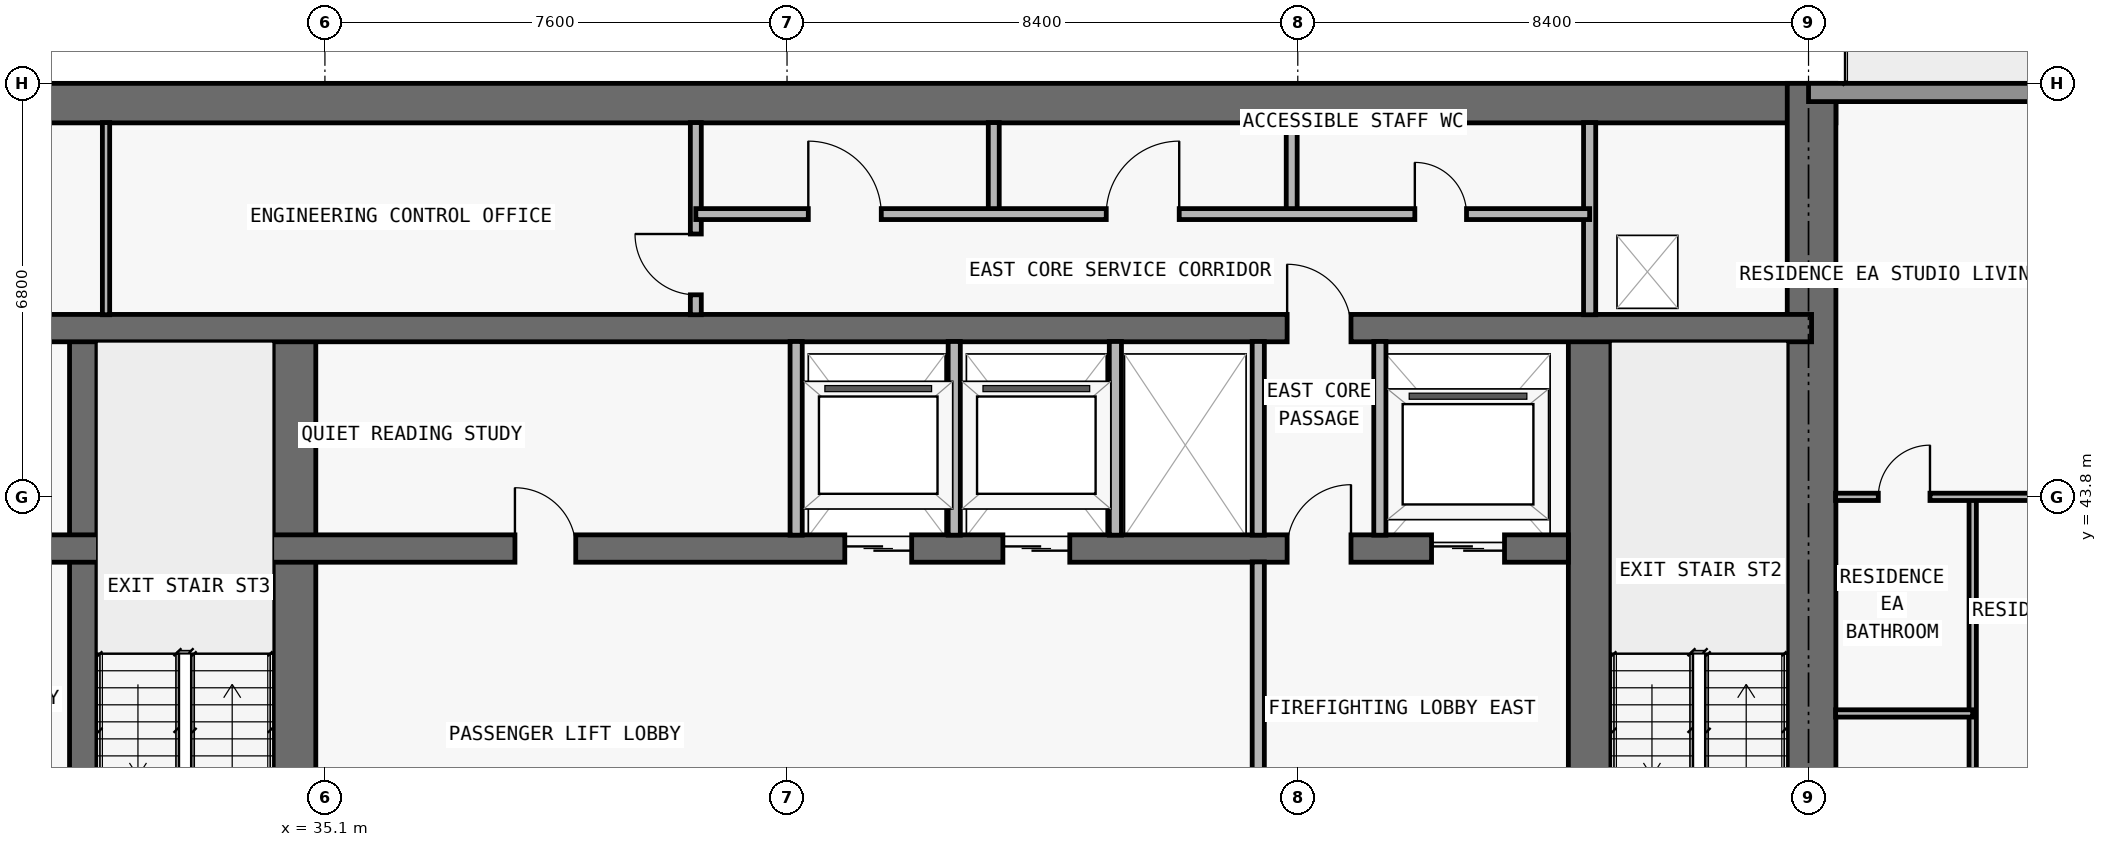
"""IFC4 building model, lengths in metres.
Left out: names, types, materials, properties, quantities, classifications, styles, units other than length and angle.
Written with IfcOpenShell. Run it as: python <this file> out.ifc"""

import sys

from ifc_helpers import new_model, si_unit, direction, frame, frame_2d, origin, place, context, subcontext, project, spatial, rectangle, extrude, element, fill, save


model = new_model("IFC4")
c1 = context("Model", 3, precision=1e-05, world=origin(), true_north=direction((0.0, 1.0)))
c2 = subcontext(c1, "Body", "Model", "MODEL_VIEW")
j1 = project(units=[si_unit("LENGTHUNIT", "METRE"), si_unit("PLANEANGLEUNIT", "RADIAN")], contexts=[c1])
p1 = place(None, origin())
s1 = spatial("IfcSite", under=j1, at=p1, CompositionType="ELEMENT")
p2 = place(p1, origin())
s2 = spatial("IfcBuilding", under=s1, at=p2, CompositionType="ELEMENT")
p3 = place(p2, frame((0.0, 0.0, 102.6)))
s3 = spatial("IfcBuildingStorey", under=s2, at=p3, CompositionType="ELEMENT", Elevation=102.6)
p4 = place(p3, frame((17.85, 50.275, 0.0), z_axis=(0.0, 0.0, 1.0), x_axis=(1.0, 0.0, 0.0)))
e1 = element("IfcWall", 1, at=p4, inside=s3, PredefinedType="SHEAR", context=c2, shape_type="SweptSolid", body=[
    extrude(rectangle(XDim=42.1, YDim=0.65, at=frame_2d((21.05, 0.0))), origin(), (0.0, 0.0, 1.0), 3.05),
])
p5 = place(p3, frame((59.55, 36.55, 0.0), z_axis=(0.0, 0.0, 1.0), x_axis=(0.0, 1.0, 0.0)))
e2 = element("IfcWall", 2, at=p5, inside=s3, PredefinedType="SHEAR", context=c2, shape_type="SweptSolid", body=[
    extrude(rectangle(XDim=14.05, YDim=0.8, at=frame_2d((7.025, 0.0))), origin(), (0.0, 0.0, 1.0), 3.05),
])
p6 = place(p3, frame((55.9, 36.95, 0.0), z_axis=(0.0, 0.0, 1.0), x_axis=(0.0, 1.0, 0.0)))
e3 = element("IfcWall", 3, at=p6, inside=s3, PredefinedType="SHEAR", context=c2, shape_type="SweptSolid", body=[
    extrude(rectangle(XDim=9.625, YDim=0.7, at=frame_2d((4.812, 0.0))), origin(), (0.0, 0.0, 1.0), 3.05),
])
p7 = place(p6, frame((0.6, 0.0, 0.0)))
e4 = element("IfcOpeningElement", 4, at=p7, cuts=e3, PredefinedType="OPENING", context=c2, shape_type="SweptSolid", body=[
    extrude(rectangle(XDim=1.1, YDim=2.15, at=frame_2d((0.55, 1.075))), frame((0.0, 0.36, 0.0), z_axis=(0.0, -1.0, 0.0), x_axis=(1.0, 0.0, 0.0)), (0.0, 0.0, 1.0), 0.72),
])
p8 = place(p3, frame((31.125, 36.95, 0.0), z_axis=(0.0, 0.0, 1.0), x_axis=(0.0, 1.0, 0.0)))
e5 = element("IfcWall", 5, at=p8, inside=s3, PredefinedType="SHEAR", context=c2, shape_type="SweptSolid", body=[
    extrude(rectangle(XDim=9.625, YDim=0.45, at=frame_2d((4.812, 0.0))), origin(), (0.0, 0.0, 1.0), 3.05),
])
p9 = place(p3, frame((34.6, 36.95, 0.0), z_axis=(0.0, 0.0, 1.0), x_axis=(0.0, 1.0, 0.0)))
e6 = element("IfcWall", 6, at=p9, inside=s3, PredefinedType="SHEAR", context=c2, shape_type="SweptSolid", body=[
    extrude(rectangle(XDim=9.625, YDim=0.7, at=frame_2d((4.812, 0.0))), origin(), (0.0, 0.0, 1.0), 3.05),
])
p10 = place(p3, frame((22.25, 42.95, 0.0), z_axis=(0.0, 0.0, 1.0), x_axis=(1.0, 0.0, 0.0)))
e7 = element("IfcWall", 7, at=p10, inside=s3, PredefinedType="SHEAR", context=c2, shape_type="SweptSolid", body=[
    extrude(rectangle(XDim=33.3, YDim=0.45, at=frame_2d((16.65, 0.0))), origin(), (0.0, 0.0, 1.0), 3.05),
])
p11 = place(p10, frame((1.05, 0.0, 0.0)))
e8 = element("IfcOpeningElement", 8, at=p11, cuts=e7, PredefinedType="OPENING", context=c2, shape_type="SweptSolid", body=[
    extrude(rectangle(XDim=1.2, YDim=2.2, at=frame_2d((0.6, 1.1))), frame((0.0, 0.235, 0.0), z_axis=(0.0, -1.0, 0.0), x_axis=(1.0, 0.0, 0.0)), (0.0, 0.0, 1.0), 0.47),
])
p12 = place(p10, frame((31.05, 0.0, 0.0)))
e9 = element("IfcOpeningElement", 9, at=p12, cuts=e7, PredefinedType="OPENING", context=c2, shape_type="SweptSolid", body=[
    extrude(rectangle(XDim=1.2, YDim=2.2, at=frame_2d((0.6, 1.1))), frame((0.0, 0.235, 0.0), z_axis=(0.0, -1.0, 0.0), x_axis=(1.0, 0.0, 0.0)), (0.0, 0.0, 1.0), 0.47),
])
p13 = place(p10, frame((21.4, 0.0, 0.0)))
e10 = element("IfcOpeningElement", 10, at=p13, cuts=e7, PredefinedType="OPENING", context=c2, shape_type="SweptSolid", body=[
    extrude(rectangle(XDim=1.1, YDim=2.2, at=frame_2d((0.55, 1.1))), frame((0.0, 0.235, 0.0), z_axis=(0.0, -1.0, 0.0), x_axis=(1.0, 0.0, 0.0)), (0.0, 0.0, 1.0), 0.47),
])
p14 = place(p10, frame((24.0, 0.0, 0.0)))
e11 = element("IfcOpeningElement", 11, at=p14, cuts=e7, PredefinedType="OPENING", context=c2, shape_type="SweptSolid", body=[
    extrude(rectangle(XDim=1.1, YDim=2.2, at=frame_2d((0.55, 1.1))), frame((0.0, 0.235, 0.0), z_axis=(0.0, -1.0, 0.0), x_axis=(1.0, 0.0, 0.0)), (0.0, 0.0, 1.0), 0.47),
])
p15 = place(p10, frame((3.625, 0.0, 0.0)))
e12 = element("IfcOpeningElement", 12, at=p15, cuts=e7, PredefinedType="OPENING", context=c2, shape_type="SweptSolid", body=[
    extrude(rectangle(XDim=1.05, YDim=2.15, at=frame_2d((0.525, 1.075))), frame((0.0, 0.235, 0.0), z_axis=(0.0, -1.0, 0.0), x_axis=(1.0, 0.0, 0.0)), (0.0, 0.0, 1.0), 0.47),
])
p16 = place(p10, frame((28.675, 0.0, 0.0)))
e13 = element("IfcOpeningElement", 13, at=p16, cuts=e7, PredefinedType="OPENING", context=c2, shape_type="SweptSolid", body=[
    extrude(rectangle(XDim=1.05, YDim=2.15, at=frame_2d((0.525, 1.075))), frame((0.0, 0.235, 0.0), z_axis=(0.0, -1.0, 0.0), x_axis=(1.0, 0.0, 0.0)), (0.0, 0.0, 1.0), 0.47),
])
p17 = place(p10, frame((15.975, 0.0, 0.0)))
e14 = element("IfcOpeningElement", 14, at=p17, cuts=e7, PredefinedType="OPENING", context=c2, shape_type="SweptSolid", body=[
    extrude(rectangle(XDim=1.0, YDim=2.2, at=frame_2d((0.5, 1.1))), frame((0.0, 0.235, 0.0), z_axis=(0.0, -1.0, 0.0), x_axis=(1.0, 0.0, 0.0)), (0.0, 0.0, 1.0), 0.47),
])
p18 = place(p3, frame((18.25, 46.575, 0.0), z_axis=(0.0, 0.0, 1.0), x_axis=(1.0, 0.0, 0.0)))
e15 = element("IfcWall", 15, at=p18, inside=s3, PredefinedType="SHEAR", context=c2, shape_type="SweptSolid", body=[
    extrude(rectangle(XDim=41.3, YDim=0.45, at=frame_2d((20.65, 0.0))), origin(), (0.0, 0.0, 1.0), 3.05),
])
p19 = place(p18, frame((7.65, 0.0, 0.0)))
e16 = element("IfcOpeningElement", 16, at=p19, cuts=e15, PredefinedType="OPENING", context=c2, shape_type="SweptSolid", body=[
    extrude(rectangle(XDim=1.0, YDim=2.2, at=frame_2d((0.5, 1.1))), frame((0.0, 0.235, 0.0), z_axis=(0.0, -1.0, 0.0), x_axis=(1.0, 0.0, 0.0)), (0.0, 0.0, 1.0), 0.47),
])
p20 = place(p18, frame((32.675, 0.0, 0.0)))
e17 = element("IfcOpeningElement", 17, at=p20, cuts=e15, PredefinedType="OPENING", context=c2, shape_type="SweptSolid", body=[
    extrude(rectangle(XDim=1.05, YDim=2.15, at=frame_2d((0.525, 1.075))), frame((0.0, 0.235, 0.0), z_axis=(0.0, -1.0, 0.0), x_axis=(1.0, 0.0, 0.0)), (0.0, 0.0, 1.0), 0.47),
])
p21 = place(p3, frame((59.5, 50.45, 0.0), z_axis=(0.0, 0.0, 1.0), x_axis=(1.0, 0.0, 0.0)))
e18 = element("IfcWall", 18, at=p21, inside=s3, PredefinedType="STANDARD", context=c2, shape_type="SweptSolid", body=[
    extrude(rectangle(XDim=10.6, YDim=0.3, at=frame_2d((5.3, 0.0))), origin(), (0.0, 0.0, 1.0), 3.05),
])
p22 = place(p21, frame((4.3, 0.0, 0.0)))
e19 = element("IfcOpeningElement", 19, at=p22, cuts=e18, PredefinedType="OPENING", context=c2, shape_type="SweptSolid", body=[
    extrude(rectangle(XDim=2.0, YDim=2.3, at=frame_2d((1.0, 1.15))), frame((0.0, 0.16, 0.0), z_axis=(0.0, -1.0, 0.0), x_axis=(1.0, 0.0, 0.0)), (0.0, 0.0, 1.0), 0.32),
])
p23 = place(p3, frame((31.5, 46.795, 0.0), z_axis=(0.0, 0.0, 1.0), x_axis=(0.0, 1.0, 0.0)))
e20 = element("IfcWall", 20, at=p23, inside=s3, PredefinedType="PARTITIONING", context=c2, shape_type="SweptSolid", body=[
    extrude(rectangle(XDim=3.16, YDim=0.12, at=frame_2d((1.58, 0.0))), origin(), (0.0, 0.0, 1.0), 3.05),
])
p24 = place(p3, frame((41.2, 46.795, 0.0), z_axis=(0.0, 0.0, 1.0), x_axis=(0.0, 1.0, 0.0)))
e21 = element("IfcWall", 21, at=p24, inside=s3, PredefinedType="PARTITIONING", context=c2, shape_type="SweptSolid", body=[
    extrude(rectangle(XDim=3.16, YDim=0.18, at=frame_2d((1.58, 0.0))), origin(), (0.0, 0.0, 1.0), 3.05),
])
p25 = place(p24, frame((0.327, 0.0, 0.0)))
e22 = element("IfcOpeningElement", 22, at=p25, cuts=e21, PredefinedType="OPENING", context=c2, shape_type="SweptSolid", body=[
    extrude(rectangle(XDim=1.0, YDim=2.2, at=frame_2d((0.5, 1.1))), frame((0.0, 0.1, 0.0), z_axis=(0.0, -1.0, 0.0), x_axis=(1.0, 0.0, 0.0)), (0.0, 0.0, 1.0), 0.2),
])
for number, where, z_axis, x_axis in (
    (23, (42.85, 43.17, 0.0), (0.0, 0.0, 1.0), (0.0, 1.0, 0.0)),
    (24, (45.45, 43.17, 0.0), (0.0, 0.0, 1.0), (0.0, 1.0, 0.0)),
):
    element("IfcWall", number, at=place(p3, frame(where, z_axis=z_axis, x_axis=x_axis)), inside=s3, PredefinedType="PARTITIONING", context=c2, shape_type="SweptSolid", body=[
        extrude(rectangle(XDim=3.185, YDim=0.2, at=frame_2d((1.593, 0.0))), origin(), (0.0, 0.0, 1.0), 3.05),
    ])
p26 = place(p3, frame((46.1, 48.45, 0.0), z_axis=(0.0, 0.0, 1.0), x_axis=(0.0, 1.0, 0.0)))
e25 = element("IfcWall", 25, at=p26, inside=s3, PredefinedType="PARTITIONING", context=c2, shape_type="SweptSolid", body=[
    extrude(rectangle(XDim=1.505, YDim=0.18, at=frame_2d((0.752, 0.0))), origin(), (0.0, 0.0, 1.0), 3.05),
])
p27 = place(p3, frame((48.1, 43.17, 0.0), z_axis=(0.0, 0.0, 1.0), x_axis=(0.0, 1.0, 0.0)))
e26 = element("IfcWall", 26, at=p27, inside=s3, PredefinedType="PARTITIONING", context=c2, shape_type="SweptSolid", body=[
    extrude(rectangle(XDim=3.185, YDim=0.2, at=frame_2d((1.593, 0.0))), origin(), (0.0, 0.0, 1.0), 3.05),
])
p28 = place(p3, frame((50.45, 37.345, 0.0), z_axis=(0.0, 0.0, 1.0), x_axis=(0.0, 1.0, 0.0)))
e27 = element("IfcWall", 27, at=p28, inside=s3, PredefinedType="PARTITIONING", context=c2, shape_type="SweptSolid", body=[
    extrude(rectangle(XDim=5.385, YDim=0.2, at=frame_2d((2.692, 0.0))), origin(), (0.0, 0.0, 1.0), 3.05),
])
p29 = place(p3, frame((50.45, 43.17, 0.0), z_axis=(0.0, 0.0, 1.0), x_axis=(0.0, 1.0, 0.0)))
e28 = element("IfcWall", 28, at=p29, inside=s3, PredefinedType="PARTITIONING", context=c2, shape_type="SweptSolid", body=[
    extrude(rectangle(XDim=3.185, YDim=0.2, at=frame_2d((1.593, 0.0))), origin(), (0.0, 0.0, 1.0), 3.05),
])
p30 = place(p3, frame((51.0, 48.45, 0.0), z_axis=(0.0, 0.0, 1.0), x_axis=(0.0, 1.0, 0.0)))
e29 = element("IfcWall", 29, at=p30, inside=s3, PredefinedType="PARTITIONING", context=c2, shape_type="SweptSolid", body=[
    extrude(rectangle(XDim=1.505, YDim=0.18, at=frame_2d((0.752, 0.0))), origin(), (0.0, 0.0, 1.0), 3.05),
])
p31 = place(p3, frame((52.45, 43.17, 0.0), z_axis=(0.0, 0.0, 1.0), x_axis=(0.0, 1.0, 0.0)))
e30 = element("IfcWall", 30, at=p31, inside=s3, PredefinedType="PARTITIONING", context=c2, shape_type="SweptSolid", body=[
    extrude(rectangle(XDim=3.185, YDim=0.2, at=frame_2d((1.593, 0.0))), origin(), (0.0, 0.0, 1.0), 3.05),
])
p32 = place(p3, frame((55.9, 46.795, 0.0), z_axis=(0.0, 0.0, 1.0), x_axis=(0.0, 1.0, 0.0)))
e31 = element("IfcWall", 31, at=p32, inside=s3, PredefinedType="PARTITIONING", context=c2, shape_type="SweptSolid", body=[
    extrude(rectangle(XDim=3.16, YDim=0.2, at=frame_2d((1.58, 0.0))), origin(), (0.0, 0.0, 1.0), 3.05),
])
p33 = place(p3, frame((62.2, 36.95, 0.0), z_axis=(0.0, 0.0, 1.0), x_axis=(0.0, 1.0, 0.0)))
e32 = element("IfcWall", 32, at=p33, inside=s3, PredefinedType="PARTITIONING", context=c2, shape_type="SweptSolid", body=[
    extrude(rectangle(XDim=6.85, YDim=0.12, at=frame_2d((3.425, 0.0))), origin(), (0.0, 0.0, 1.0), 3.05),
])
p34 = place(p33, frame((1.219, 0.0, 0.0)))
e33 = element("IfcOpeningElement", 33, at=p34, cuts=e32, PredefinedType="OPENING", context=c2, shape_type="SweptSolid", body=[
    extrude(rectangle(XDim=0.85, YDim=2.1, at=frame_2d((0.425, 1.05))), frame((0.0, 0.07, 0.0), z_axis=(0.0, -1.0, 0.0), x_axis=(1.0, 0.0, 0.0)), (0.0, 0.0, 1.0), 0.14),
])
p35 = place(p3, frame((59.945, 40.238, 0.0), z_axis=(0.0, 0.0, 1.0), x_axis=(1.0, 0.0, 0.0)))
e34 = element("IfcWall", 34, at=p35, inside=s3, PredefinedType="PARTITIONING", context=c2, shape_type="SweptSolid", body=[
    extrude(rectangle(XDim=2.255, YDim=0.12, at=frame_2d((1.127, 0.0))), origin(), (0.0, 0.0, 1.0), 3.05),
])
p36 = place(p3, frame((59.945, 43.8, 0.0), z_axis=(0.0, 0.0, 1.0), x_axis=(1.0, 0.0, 0.0)))
e35 = element("IfcWall", 35, at=p36, inside=s3, PredefinedType="PARTITIONING", context=c2, shape_type="SweptSolid", body=[
    extrude(rectangle(XDim=13.66, YDim=0.12, at=frame_2d((6.83, 0.0))), origin(), (0.0, 0.0, 1.0), 2.339),
])
p37 = place(p36, frame((4.017, 0.0, 0.0)))
e36 = element("IfcOpeningElement", 36, at=p37, cuts=e35, PredefinedType="OPENING", context=c2, shape_type="SweptSolid", body=[
    extrude(rectangle(XDim=0.9, YDim=2.15, at=frame_2d((0.45, 1.075))), frame((0.0, 0.07, 0.0), z_axis=(0.0, -1.0, 0.0), x_axis=(1.0, 0.0, 0.0)), (0.0, 0.0, 1.0), 0.14),
])
p38 = place(p36, frame((0.702, 0.0, 0.0)))
e37 = element("IfcOpeningElement", 37, at=p38, cuts=e35, PredefinedType="OPENING", context=c2, shape_type="SweptSolid", body=[
    extrude(rectangle(XDim=0.85, YDim=2.1, at=frame_2d((0.425, 1.05))), frame((0.0, 0.07, 0.0), z_axis=(0.0, -1.0, 0.0), x_axis=(1.0, 0.0, 0.0)), (0.0, 0.0, 1.0), 0.14),
])
p39 = place(p3, frame((41.2, 48.45, 0.0), z_axis=(0.0, 0.0, 1.0), x_axis=(1.0, 0.0, 0.0)))
e38 = element("IfcWall", 38, at=p39, inside=s3, PredefinedType="PARTITIONING", context=c2, shape_type="SweptSolid", body=[
    extrude(rectangle(XDim=14.7, YDim=0.18, at=frame_2d((7.35, 0.0))), origin(), (0.0, 0.0, 1.0), 3.05),
])
p40 = place(p39, frame((1.85, 0.0, 0.0)))
e39 = element("IfcOpeningElement", 39, at=p40, cuts=e38, PredefinedType="OPENING", context=c2, shape_type="SweptSolid", body=[
    extrude(rectangle(XDim=1.2, YDim=2.2, at=frame_2d((0.6, 1.1))), frame((0.0, 0.1, 0.0), z_axis=(0.0, -1.0, 0.0), x_axis=(1.0, 0.0, 0.0)), (0.0, 0.0, 1.0), 0.2),
])
p41 = place(p39, frame((6.75, 0.0, 0.0)))
e40 = element("IfcOpeningElement", 40, at=p41, cuts=e38, PredefinedType="OPENING", context=c2, shape_type="SweptSolid", body=[
    extrude(rectangle(XDim=1.2, YDim=2.2, at=frame_2d((0.6, 1.1))), frame((0.0, 0.1, 0.0), z_axis=(0.0, -1.0, 0.0), x_axis=(1.0, 0.0, 0.0)), (0.0, 0.0, 1.0), 0.2),
])
p42 = place(p39, frame((11.825, 0.0, 0.0)))
e41 = element("IfcOpeningElement", 41, at=p42, cuts=e38, PredefinedType="OPENING", context=c2, shape_type="SweptSolid", body=[
    extrude(rectangle(XDim=0.85, YDim=2.1, at=frame_2d((0.425, 1.05))), frame((0.0, 0.1, 0.0), z_axis=(0.0, -1.0, 0.0), x_axis=(1.0, 0.0, 0.0)), (0.0, 0.0, 1.0), 0.2),
])
p43 = place(p12, origin())
e42 = element("IfcDoor", 42, at=p43, inside=s3, OperationType="DOUBLE_DOOR_SLIDING", PredefinedType="DOOR", context=c2, shape_type="SweptSolid", body=[
    extrude(rectangle(XDim=1.2, YDim=2.2, at=frame_2d((0.6, 1.1))), frame((0.0, 0.025, 0.0), z_axis=(0.0, -1.0, 0.0), x_axis=(1.0, 0.0, 0.0)), (0.0, 0.0, 1.0), 0.05),
])
fill(e9, e42)
p44 = place(p13, origin())
e43 = element("IfcDoor", 43, at=p44, inside=s3, OperationType="DOUBLE_DOOR_SLIDING", PredefinedType="DOOR", context=c2, shape_type="SweptSolid", body=[
    extrude(rectangle(XDim=1.1, YDim=2.2, at=frame_2d((0.55, 1.1))), frame((0.0, 0.025, 0.0), z_axis=(0.0, -1.0, 0.0), x_axis=(1.0, 0.0, 0.0)), (0.0, 0.0, 1.0), 0.05),
])
fill(e10, e43)
p45 = place(p14, origin())
e44 = element("IfcDoor", 44, at=p45, inside=s3, OperationType="DOUBLE_DOOR_SLIDING", PredefinedType="DOOR", context=c2, shape_type="SweptSolid", body=[
    extrude(rectangle(XDim=1.1, YDim=2.2, at=frame_2d((0.55, 1.1))), frame((0.0, 0.025, 0.0), z_axis=(0.0, -1.0, 0.0), x_axis=(1.0, 0.0, 0.0)), (0.0, 0.0, 1.0), 0.05),
])
fill(e11, e44)
p46 = place(p16, origin())
e45 = element("IfcDoor", 45, at=p46, inside=s3, OperationType="SINGLE_SWING_RIGHT", PredefinedType="DOOR", context=c2, shape_type="SweptSolid", body=[
    extrude(rectangle(XDim=1.05, YDim=2.15, at=frame_2d((0.525, 1.075))), frame((0.0, 0.025, 0.0), z_axis=(0.0, -1.0, 0.0), x_axis=(1.0, 0.0, 0.0)), (0.0, 0.0, 1.0), 0.05),
])
fill(e13, e45)
p47 = place(p17, origin())
e46 = element("IfcDoor", 46, at=p47, inside=s3, OperationType="SINGLE_SWING_LEFT", PredefinedType="DOOR", context=c2, shape_type="SweptSolid", body=[
    extrude(rectangle(XDim=1.0, YDim=2.2, at=frame_2d((0.5, 1.1))), frame((0.0, 0.025, 0.0), z_axis=(0.0, -1.0, 0.0), x_axis=(1.0, 0.0, 0.0)), (0.0, 0.0, 1.0), 0.05),
])
fill(e14, e46)
p48 = place(p20, origin())
e47 = element("IfcDoor", 47, at=p48, inside=s3, OperationType="SINGLE_SWING_LEFT", PredefinedType="DOOR", context=c2, shape_type="SweptSolid", body=[
    extrude(rectangle(XDim=1.05, YDim=2.15, at=frame_2d((0.525, 1.075))), frame((0.0, 0.025, 0.0), z_axis=(0.0, -1.0, 0.0), x_axis=(1.0, 0.0, 0.0)), (0.0, 0.0, 1.0), 0.05),
])
fill(e17, e47)
p49 = place(p25, origin())
e48 = element("IfcDoor", 48, at=p49, inside=s3, OperationType="SINGLE_SWING_RIGHT", PredefinedType="DOOR", context=c2, shape_type="SweptSolid", body=[
    extrude(rectangle(XDim=1.0, YDim=2.2, at=frame_2d((0.5, 1.1))), frame((0.0, 0.025, 0.0), z_axis=(0.0, -1.0, 0.0), x_axis=(1.0, 0.0, 0.0)), (0.0, 0.0, 1.0), 0.05),
])
fill(e22, e48)
p50 = place(p40, origin())
e49 = element("IfcDoor", 49, at=p50, inside=s3, OperationType="SINGLE_SWING_LEFT", PredefinedType="DOOR", context=c2, shape_type="SweptSolid", body=[
    extrude(rectangle(XDim=1.2, YDim=2.2, at=frame_2d((0.6, 1.1))), frame((0.0, 0.025, 0.0), z_axis=(0.0, -1.0, 0.0), x_axis=(1.0, 0.0, 0.0)), (0.0, 0.0, 1.0), 0.05),
])
fill(e39, e49)
p51 = place(p41, origin())
e50 = element("IfcDoor", 50, at=p51, inside=s3, OperationType="SINGLE_SWING_RIGHT", PredefinedType="DOOR", context=c2, shape_type="SweptSolid", body=[
    extrude(rectangle(XDim=1.2, YDim=2.2, at=frame_2d((0.6, 1.1))), frame((0.0, 0.025, 0.0), z_axis=(0.0, -1.0, 0.0), x_axis=(1.0, 0.0, 0.0)), (0.0, 0.0, 1.0), 0.05),
])
fill(e40, e50)
p52 = place(p42, origin())
e51 = element("IfcDoor", 51, at=p52, inside=s3, OperationType="SINGLE_SWING_LEFT", PredefinedType="DOOR", context=c2, shape_type="SweptSolid", body=[
    extrude(rectangle(XDim=0.85, YDim=2.1, at=frame_2d((0.425, 1.05))), frame((0.0, 0.025, 0.0), z_axis=(0.0, -1.0, 0.0), x_axis=(1.0, 0.0, 0.0)), (0.0, 0.0, 1.0), 0.05),
])
fill(e41, e51)
p53 = place(p38, origin())
e52 = element("IfcDoor", 52, at=p53, inside=s3, OperationType="SINGLE_SWING_RIGHT", PredefinedType="DOOR", context=c2, shape_type="SweptSolid", body=[
    extrude(rectangle(XDim=0.85, YDim=2.1, at=frame_2d((0.425, 1.05))), frame((0.0, 0.025, 0.0), z_axis=(0.0, -1.0, 0.0), x_axis=(1.0, 0.0, 0.0)), (0.0, 0.0, 1.0), 0.05),
])
fill(e37, e52)
save(model, sys.argv[1])
